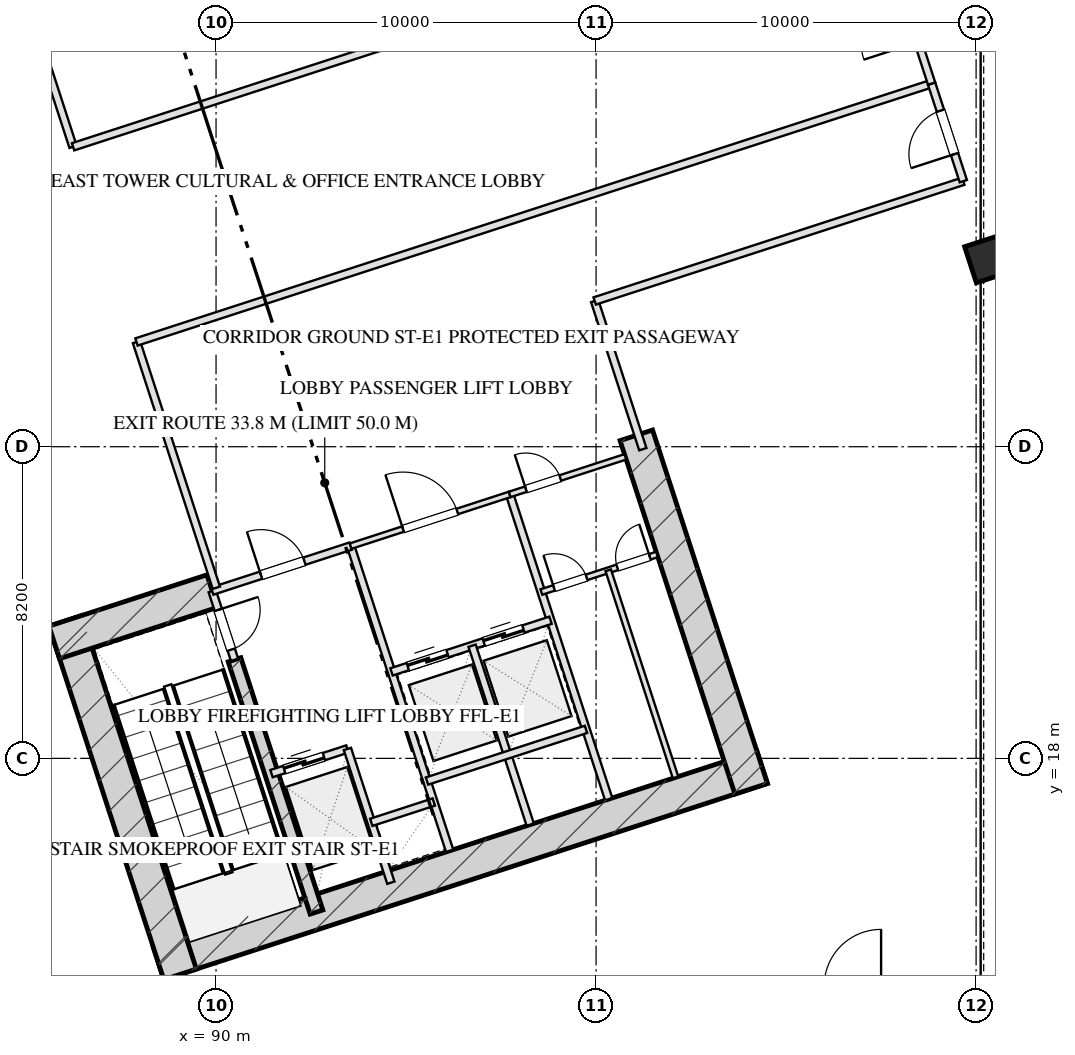
"""IFC4 building model, lengths in metres.
Left out: names, types, materials, properties, quantities, classifications, styles, units other than length and angle.
Written with IfcOpenShell. Run it as: python <this file> out.ifc"""

import sys

from ifc_helpers import new_model, si_unit, direction, frame, frame_2d, origin, origin_2d, place, context, subcontext, project, spatial, rectangle, hollow_rectangle, extrude, element, fill, save


model = new_model("IFC4")
c1 = context("Model", 3, precision=1e-05, world=origin(), true_north=direction((0.0, 1.0)))
c2 = subcontext(c1, "Body", "Model", "MODEL_VIEW")
j1 = project(units=[si_unit("LENGTHUNIT", "METRE"), si_unit("PLANEANGLEUNIT", "RADIAN")], contexts=[c1])
p1 = place(None, origin())
s1 = spatial("IfcSite", under=j1, at=p1, CompositionType="ELEMENT")
p2 = place(p1, origin())
s2 = spatial("IfcBuilding", under=s1, at=p2, CompositionType="ELEMENT")
p3 = place(p2, origin())
s3 = spatial("IfcBuildingStorey", under=s2, at=p3, CompositionType="ELEMENT", Elevation=0.0)
p4 = place(p3, frame((88.487, 12.605, 0.0), z_axis=(0.0, 0.0, 1.0), x_axis=(0.951055016115, 0.309021611416, 0.0)))
e1 = element("IfcWall", 1, at=p4, inside=s3, PredefinedType="SHEAR", context=c2, shape_type="SweptSolid", body=[
    extrude(rectangle(XDim=16.7, YDim=0.9, at=frame_2d((8.35, 0.0))), origin(), (0.0, 0.0, 1.0), 6.0),
])
p5 = place(p3, frame((86.032, 21.618, 0.0), z_axis=(0.0, 0.0, 1.0), x_axis=(0.30901438634, -0.951057363693, 0.0)))
e2 = element("IfcWall", 2, at=p5, inside=s3, PredefinedType="SHEAR", context=c2, shape_type="SweptSolid", body=[
    extrude(rectangle(XDim=9.78, YDim=0.9, at=frame_2d((4.89, 0.0))), origin(), (0.0, 0.0, 1.0), 6.0),
])
p6 = place(p3, frame((101.059, 26.5, 0.0), z_axis=(0.0, 0.0, 1.0), x_axis=(0.309021722829, -0.951054979914, 0.0)))
e3 = element("IfcWall", 3, at=p6, inside=s3, PredefinedType="SHEAR", context=c2, shape_type="SweptSolid", body=[
    extrude(rectangle(XDim=9.78, YDim=0.9, at=frame_2d((4.89, 0.0))), origin(), (0.0, 0.0, 1.0), 6.0),
])
p7 = place(p3, frame((90.486, 20.594, 0.0), z_axis=(0.0, 0.0, 1.0), x_axis=(0.309020428229, -0.951055400562, 0.0)))
e4 = element("IfcWall", 4, at=p7, inside=s3, PredefinedType="SHEAR", context=c2, shape_type="SweptSolid", body=[
    extrude(rectangle(XDim=6.98, YDim=0.35, at=frame_2d((3.49, 0.0))), origin(), (0.0, 0.0, 1.0), 6.0),
])
p8 = place(p3, frame((85.743, 21.051, 0.0), z_axis=(0.0, 0.0, 1.0), x_axis=(0.951063623806, 0.308995118848, 0.0)))
e5 = element("IfcWall", 5, at=p8, inside=s3, PredefinedType="SHEAR", context=c2, shape_type="SweptSolid", body=[
    extrude(rectangle(XDim=4.37, YDim=0.9, at=frame_2d((2.185, 0.0))), origin(), (0.0, 0.0, 1.0), 6.0),
])
p9 = place(p3, frame((110.328, 31.142, 0.0), z_axis=(0.0, 0.0, 1.0), x_axis=(0.951056516295, 0.309016994375, 0.0)))
e6 = element("IfcColumn", 6, at=p9, inside=s3, PredefinedType="COLUMN", context=c2, shape_type="SweptSolid", body=[
    extrude(hollow_rectangle(XDim=1.0, YDim=1.0, WallThickness=0.036, at=origin_2d()), origin(), (0.0, 0.0, 1.0), 6.001),
])
p10 = place(p3, frame((89.899, 22.401, 0.0), z_axis=(0.0, 0.0, 1.0), x_axis=(0.308932062672, -0.951084108086, 0.0)))
e7 = element("IfcWall", 7, at=p10, inside=s3, PredefinedType="PARTITIONING", context=c2, shape_type="SweptSolid", body=[
    extrude(rectangle(XDim=1.9, YDim=0.2, at=frame_2d((0.95, 0.0))), origin(), (0.0, 0.0, 1.0), 5.685),
])
p11 = place(p10, frame((0.52, 0.0, 0.0)))
e8 = element("IfcOpeningElement", 8, at=p11, cuts=e7, PredefinedType="OPENING", context=c2, shape_type="SweptSolid", body=[
    extrude(rectangle(XDim=1.1, YDim=2.05, at=frame_2d((0.55, 1.025))), frame((0.0, 0.11, 0.0), z_axis=(0.0, -1.0, 0.0), x_axis=(1.0, 0.0, 0.0)), (0.0, 0.0, 1.0), 0.22),
])
p12 = place(p3, frame((93.542, 23.585, 0.0), z_axis=(0.0, 0.0, 1.0), x_axis=(0.309042196757, -0.951048327176, 0.0)))
e9 = element("IfcWall", 9, at=p12, inside=s3, PredefinedType="PARTITIONING", context=c2, shape_type="SweptSolid", body=[
    extrude(rectangle(XDim=8.43, YDim=0.2, at=frame_2d((4.215, 0.0))), origin(), (0.0, 0.0, 1.0), 5.685),
])
p13 = place(p3, frame((89.899, 22.401, 0.0), z_axis=(0.0, 0.0, 1.0), x_axis=(0.951046716504, 0.309047153403, 0.0)))
e10 = element("IfcWall", 10, at=p13, inside=s3, PredefinedType="PARTITIONING", context=c2, shape_type="SweptSolid", body=[
    extrude(rectangle(XDim=3.83, YDim=0.2, at=frame_2d((1.915, 0.0))), origin(), (0.0, 0.0, 1.0), 5.685),
])
p14 = place(p13, frame((1.35, 0.0, 0.0)))
e11 = element("IfcOpeningElement", 11, at=p14, cuts=e10, PredefinedType="OPENING", context=c2, shape_type="SweptSolid", body=[
    extrude(rectangle(XDim=1.2, YDim=2.05, at=frame_2d((0.6, 1.025))), frame((0.0, 0.11, 0.0), z_axis=(0.0, -1.0, 0.0), x_axis=(1.0, 0.0, 0.0)), (0.0, 0.0, 1.0), 0.22),
])
p15 = place(p3, frame((91.46, 17.598, 0.0), z_axis=(0.0, 0.0, 1.0), x_axis=(0.951062257173, 0.308999325213, 0.0)))
e12 = element("IfcWall", 12, at=p15, inside=s3, PredefinedType="PARTITIONING", context=c2, shape_type="SweptSolid", body=[
    extrude(rectangle(XDim=2.1, YDim=0.2, at=frame_2d((1.05, 0.0))), origin(), (0.0, 0.0, 1.0), 5.685),
])
p16 = place(p15, frame((0.35, 0.0, 0.0)))
e13 = element("IfcOpeningElement", 13, at=p16, cuts=e12, PredefinedType="OPENING", context=c2, shape_type="SweptSolid", body=[
    extrude(rectangle(XDim=1.1, YDim=2.05, at=frame_2d((0.55, 1.025))), frame((0.0, 0.11, 0.0), z_axis=(0.0, -1.0, 0.0), x_axis=(1.0, 0.0, 0.0)), (0.0, 0.0, 1.0), 0.22),
])
p17 = place(p3, frame((93.457, 18.247, 0.0), z_axis=(0.0, 0.0, 1.0), x_axis=(0.3089935693, -0.951064127245, 0.0)))
e14 = element("IfcWall", 14, at=p17, inside=s3, PredefinedType="PARTITIONING", context=c2, shape_type="SweptSolid", body=[
    extrude(rectangle(XDim=3.7, YDim=0.2, at=frame_2d((1.85, 0.0))), origin(), (0.0, 0.0, 1.0), 5.685),
])
p18 = place(p3, frame((94.084, 16.317, 0.0), z_axis=(0.0, 0.0, 1.0), x_axis=(0.951041328149, 0.309063734775, 0.0)))
e15 = element("IfcWall", 15, at=p18, inside=s3, PredefinedType="PARTITIONING", context=c2, shape_type="SweptSolid", body=[
    extrude(rectangle(XDim=1.73, YDim=0.2, at=frame_2d((0.865, 0.0))), origin(), (0.0, 0.0, 1.0), 5.685),
])
p19 = place(p3, frame((97.727, 24.944, 0.0), z_axis=(0.0, 0.0, 1.0), x_axis=(0.309016001439, -0.951056838919, 0.0)))
e16 = element("IfcWall", 16, at=p19, inside=s3, PredefinedType="PARTITIONING", context=c2, shape_type="SweptSolid", body=[
    extrude(rectangle(XDim=8.43, YDim=0.2, at=frame_2d((4.215, 0.0))), origin(), (0.0, 0.0, 1.0), 5.685),
])
p20 = place(p3, frame((93.542, 23.585, 0.0), z_axis=(0.0, 0.0, 1.0), x_axis=(0.951063829732, 0.308994485023, 0.0)))
e17 = element("IfcWall", 17, at=p20, inside=s3, PredefinedType="PARTITIONING", context=c2, shape_type="SweptSolid", body=[
    extrude(rectangle(XDim=4.4, YDim=0.15, at=frame_2d((2.2, 0.0))), origin(), (0.0, 0.0, 1.0), 5.685),
])
p21 = place(p20, frame((1.45, 0.0, 0.0)))
e18 = element("IfcOpeningElement", 18, at=p21, cuts=e17, PredefinedType="OPENING", context=c2, shape_type="SweptSolid", body=[
    extrude(rectangle(XDim=1.5, YDim=2.05, at=frame_2d((0.75, 1.025))), frame((0.0, 0.085, 0.0), z_axis=(0.0, -1.0, 0.0), x_axis=(1.0, 0.0, 0.0)), (0.0, 0.0, 1.0), 0.17),
])
p22 = place(p3, frame((94.617, 20.275, 0.0), z_axis=(0.0, 0.0, 1.0), x_axis=(0.951058531764, 0.30901079133, 0.0)))
e19 = element("IfcWall", 19, at=p22, inside=s3, PredefinedType="PARTITIONING", context=c2, shape_type="SweptSolid", body=[
    extrude(rectangle(XDim=4.4, YDim=0.2, at=frame_2d((2.2, 0.0))), origin(), (0.0, 0.0, 1.0), 5.685),
])
p23 = place(p22, frame((0.45, 0.0, 0.0)))
e20 = element("IfcOpeningElement", 20, at=p23, cuts=e19, PredefinedType="OPENING", context=c2, shape_type="SweptSolid", body=[
    extrude(rectangle(XDim=1.1, YDim=2.05, at=frame_2d((0.55, 1.025))), frame((0.0, 0.11, 0.0), z_axis=(0.0, -1.0, 0.0), x_axis=(1.0, 0.0, 0.0)), (0.0, 0.0, 1.0), 0.22),
])
p24 = place(p22, frame((2.55, 0.0, 0.0)))
e21 = element("IfcOpeningElement", 21, at=p24, cuts=e19, PredefinedType="OPENING", context=c2, shape_type="SweptSolid", body=[
    extrude(rectangle(XDim=1.1, YDim=2.05, at=frame_2d((0.55, 1.025))), frame((0.0, 0.11, 0.0), z_axis=(0.0, -1.0, 0.0), x_axis=(1.0, 0.0, 0.0)), (0.0, 0.0, 1.0), 0.22),
])
p25 = place(p3, frame((96.738, 20.964, 0.0), z_axis=(0.0, 0.0, 1.0), x_axis=(0.309042578481, -0.951048203135, 0.0)))
e22 = element("IfcWall", 22, at=p25, inside=s3, PredefinedType="PARTITIONING", context=c2, shape_type="SweptSolid", body=[
    extrude(rectangle(XDim=4.95, YDim=0.2, at=frame_2d((2.475, 0.0))), origin(), (0.0, 0.0, 1.0), 5.685),
])
p26 = place(p3, frame((95.551, 17.403, 0.0), z_axis=(0.0, 0.0, 1.0), x_axis=(0.951058531764, 0.30901079133, 0.0)))
e23 = element("IfcWall", 23, at=p26, inside=s3, PredefinedType="PARTITIONING", context=c2, shape_type="SweptSolid", body=[
    extrude(rectangle(XDim=4.4, YDim=0.2, at=frame_2d((2.2, 0.0))), origin(), (0.0, 0.0, 1.0), 5.685),
])
p27 = place(p3, frame((97.727, 24.944, 0.0), z_axis=(0.0, 0.0, 1.0), x_axis=(0.951036872128, 0.309077446369, 0.0)))
e24 = element("IfcWall", 24, at=p27, inside=s3, PredefinedType="PARTITIONING", context=c2, shape_type="SweptSolid", body=[
    extrude(rectangle(XDim=3.2, YDim=0.15, at=frame_2d((1.6, 0.0))), origin(), (0.0, 0.0, 1.0), 5.685),
])
p28 = place(p27, frame((0.45, 0.0, 0.0)))
e25 = element("IfcOpeningElement", 25, at=p28, cuts=e24, PredefinedType="OPENING", context=c2, shape_type="SweptSolid", body=[
    extrude(rectangle(XDim=0.95, YDim=2.05, at=frame_2d((0.475, 1.025))), frame((0.0, 0.085, 0.0), z_axis=(0.0, -1.0, 0.0), x_axis=(1.0, 0.0, 0.0)), (0.0, 0.0, 1.0), 0.17),
])
p29 = place(p3, frame((98.561, 22.376, 0.0), z_axis=(0.0, 0.0, 1.0), x_axis=(0.95104415986, 0.309055020985, 0.0)))
e26 = element("IfcWall", 26, at=p29, inside=s3, PredefinedType="PARTITIONING", context=c2, shape_type="SweptSolid", body=[
    extrude(rectangle(XDim=3.2, YDim=0.15, at=frame_2d((1.6, 0.0))), origin(), (0.0, 0.0, 1.0), 5.685),
])
p30 = place(p29, frame((0.35, 0.0, 0.0)))
e27 = element("IfcOpeningElement", 27, at=p30, cuts=e26, PredefinedType="OPENING", context=c2, shape_type="SweptSolid", body=[
    extrude(rectangle(XDim=0.9, YDim=2.05, at=frame_2d((0.45, 1.025))), frame((0.0, 0.085, 0.0), z_axis=(0.0, -1.0, 0.0), x_axis=(1.0, 0.0, 0.0)), (0.0, 0.0, 1.0), 0.17),
])
p31 = place(p29, frame((2.1, 0.0, 0.0)))
e28 = element("IfcOpeningElement", 28, at=p31, cuts=e26, PredefinedType="OPENING", context=c2, shape_type="SweptSolid", body=[
    extrude(rectangle(XDim=0.9, YDim=2.05, at=frame_2d((0.45, 1.025))), frame((0.0, 0.085, 0.0), z_axis=(0.0, -1.0, 0.0), x_axis=(1.0, 0.0, 0.0)), (0.0, 0.0, 1.0), 0.17),
])
p32 = place(p3, frame((100.32, 22.948, 0.0), z_axis=(0.0, 0.0, 1.0), x_axis=(0.309035009867, -0.951050662518, 0.0)))
e29 = element("IfcWall", 29, at=p32, inside=s3, PredefinedType="PARTITIONING", context=c2, shape_type="SweptSolid", body=[
    extrude(rectangle(XDim=5.73, YDim=0.15, at=frame_2d((2.865, 0.0))), origin(), (0.0, 0.0, 1.0), 5.685),
])
p33 = place(p3, frame((90.008, 22.489, 0.0), z_axis=(0.0, 0.0, 1.0), x_axis=(-0.309023559774, 0.951054383043, 0.0)))
e30 = element("IfcWall", 30, at=p33, inside=s3, PredefinedType="PARTITIONING", context=c2, shape_type="SweptSolid", body=[
    extrude(rectangle(XDim=6.8, YDim=0.2, at=frame_2d((3.4, 0.0))), origin(), (0.0, 0.0, 1.0), 5.685),
])
p34 = place(p3, frame((87.906, 28.956, 0.0), z_axis=(0.0, 0.0, 1.0), x_axis=(0.951056330024, 0.309017567658, 0.0)))
e31 = element("IfcWall", 31, at=p34, inside=s3, PredefinedType="PARTITIONING", context=c2, shape_type="SweptSolid", body=[
    extrude(rectangle(XDim=22.0, YDim=0.2, at=frame_2d((11.0, 0.0))), origin(), (0.0, 0.0, 1.0), 5.685),
])
p35 = place(p3, frame((101.23, 26.135, 0.0), z_axis=(0.0, 0.0, 1.0), x_axis=(-0.30903760131, 0.951049820449, 0.0)))
e32 = element("IfcWall", 32, at=p35, inside=s3, PredefinedType="PARTITIONING", context=c2, shape_type="SweptSolid", body=[
    extrude(rectangle(XDim=4.1, YDim=0.2, at=frame_2d((2.05, 0.0))), origin(), (0.0, 0.0, 1.0), 5.685),
])
p36 = place(p3, frame((99.963, 30.035, 0.0), z_axis=(0.0, 0.0, 1.0), x_axis=(0.951061328589, 0.309002183266, 0.0)))
e33 = element("IfcWall", 33, at=p36, inside=s3, PredefinedType="PARTITIONING", context=c2, shape_type="SweptSolid", body=[
    extrude(rectangle(XDim=10.2, YDim=0.2, at=frame_2d((5.1, 0.0))), origin(), (0.0, 0.0, 1.0), 5.685),
])
p37 = place(p3, frame((109.664, 33.187, 0.0), z_axis=(0.0, 0.0, 1.0), x_axis=(-0.309057448393, 0.951043371037, 0.0)))
e34 = element("IfcWall", 34, at=p37, inside=s3, PredefinedType="PARTITIONING", context=c2, shape_type="SweptSolid", body=[
    extrude(rectangle(XDim=2.7, YDim=0.2, at=frame_2d((1.35, 0.0))), origin(), (0.0, 0.0, 1.0), 5.685),
])
p38 = place(p37, frame((0.75, 0.0, 0.0)))
e35 = element("IfcOpeningElement", 35, at=p38, cuts=e34, PredefinedType="OPENING", context=c2, shape_type="SweptSolid", body=[
    extrude(rectangle(XDim=1.2, YDim=2.05, at=frame_2d((0.6, 1.025))), frame((0.0, 0.11, 0.0), z_axis=(0.0, -1.0, 0.0), x_axis=(1.0, 0.0, 0.0)), (0.0, 0.0, 1.0), 0.22),
])
p39 = place(p3, frame((86.238, 34.092, 0.0), z_axis=(0.0, 0.0, 1.0), x_axis=(-0.309022900594, 0.951054597228, 0.0)))
e36 = element("IfcWall", 36, at=p39, inside=s3, PredefinedType="PARTITIONING", context=c2, shape_type="SweptSolid", body=[
    extrude(rectangle(XDim=9.7, YDim=0.2, at=frame_2d((4.85, 0.0))), origin(), (0.0, 0.0, 1.0), 5.685),
])
p40 = place(p3, frame((86.238, 34.092, 0.0), z_axis=(0.0, 0.0, 1.0), x_axis=(0.951056330024, 0.309017567658, 0.0)))
e37 = element("IfcWall", 37, at=p40, inside=s3, PredefinedType="PARTITIONING", context=c2, shape_type="SweptSolid", body=[
    extrude(rectangle(XDim=22.0, YDim=0.2, at=frame_2d((11.0, 0.0))), origin(), (0.0, 0.0, 1.0), 5.685),
])
p41 = place(p3, frame((108.829, 35.754, 0.0), z_axis=(0.0, 0.0, 1.0), x_axis=(-0.309016555588, 0.951056658866, 0.0)))
e38 = element("IfcWall", 38, at=p41, inside=s3, PredefinedType="PARTITIONING", context=c2, shape_type="SweptSolid", body=[
    extrude(rectangle(XDim=5.4, YDim=0.2, at=frame_2d((2.7, 0.0))), origin(), (0.0, 0.0, 1.0), 5.685),
])
p42 = place(p41, frame((1.15, 0.0, 0.0)))
e39 = element("IfcOpeningElement", 39, at=p42, cuts=e38, PredefinedType="OPENING", context=c2, shape_type="SweptSolid", body=[
    extrude(rectangle(XDim=1.5, YDim=2.05, at=frame_2d((0.75, 1.025))), frame((0.0, 0.11, 0.0), z_axis=(0.0, -1.0, 0.0), x_axis=(1.0, 0.0, 0.0)), (0.0, 0.0, 1.0), 0.22),
])
p43 = place(p11, origin())
e40 = element("IfcDoor", 40, at=p43, inside=s3, OperationType="SINGLE_SWING_LEFT", PredefinedType="DOOR", context=c2, shape_type="SweptSolid", body=[
    extrude(rectangle(XDim=1.1, YDim=2.05, at=frame_2d((0.55, 1.025))), frame((0.0, 0.025, 0.0), z_axis=(0.0, -1.0, 0.0), x_axis=(1.0, 0.0, 0.0)), (0.0, 0.0, 1.0), 0.05),
])
fill(e8, e40)
p44 = place(p14, origin())
e41 = element("IfcDoor", 41, at=p44, inside=s3, OperationType="SINGLE_SWING_LEFT", PredefinedType="DOOR", context=c2, shape_type="SweptSolid", body=[
    extrude(rectangle(XDim=1.2, YDim=2.05, at=frame_2d((0.6, 1.025))), frame((0.0, 0.025, 0.0), z_axis=(0.0, -1.0, 0.0), x_axis=(1.0, 0.0, 0.0)), (0.0, 0.0, 1.0), 0.05),
])
fill(e11, e41)
p45 = place(p16, origin())
e42 = element("IfcDoor", 42, at=p45, inside=s3, OperationType="DOUBLE_DOOR_SLIDING", PredefinedType="DOOR", context=c2, shape_type="SweptSolid", body=[
    extrude(rectangle(XDim=1.1, YDim=2.05, at=frame_2d((0.55, 1.025))), frame((0.0, 0.025, 0.0), z_axis=(0.0, -1.0, 0.0), x_axis=(1.0, 0.0, 0.0)), (0.0, 0.0, 1.0), 0.05),
])
fill(e13, e42)
p46 = place(p21, origin())
e43 = element("IfcDoor", 43, at=p46, inside=s3, OperationType="SINGLE_SWING_LEFT", PredefinedType="DOOR", context=c2, shape_type="SweptSolid", body=[
    extrude(rectangle(XDim=1.5, YDim=2.05, at=frame_2d((0.75, 1.025))), frame((0.0, 0.025, 0.0), z_axis=(0.0, -1.0, 0.0), x_axis=(1.0, 0.0, 0.0)), (0.0, 0.0, 1.0), 0.05),
])
fill(e18, e43)
p47 = place(p23, origin())
e44 = element("IfcDoor", 44, at=p47, inside=s3, OperationType="DOUBLE_DOOR_SLIDING", PredefinedType="DOOR", context=c2, shape_type="SweptSolid", body=[
    extrude(rectangle(XDim=1.1, YDim=2.05, at=frame_2d((0.55, 1.025))), frame((0.0, 0.025, 0.0), z_axis=(0.0, -1.0, 0.0), x_axis=(1.0, 0.0, 0.0)), (0.0, 0.0, 1.0), 0.05),
])
fill(e20, e44)
p48 = place(p24, origin())
e45 = element("IfcDoor", 45, at=p48, inside=s3, OperationType="DOUBLE_DOOR_SLIDING", PredefinedType="DOOR", context=c2, shape_type="SweptSolid", body=[
    extrude(rectangle(XDim=1.1, YDim=2.05, at=frame_2d((0.55, 1.025))), frame((0.0, 0.025, 0.0), z_axis=(0.0, -1.0, 0.0), x_axis=(1.0, 0.0, 0.0)), (0.0, 0.0, 1.0), 0.05),
])
fill(e21, e45)
p49 = place(p28, origin())
e46 = element("IfcDoor", 46, at=p49, inside=s3, OperationType="SINGLE_SWING_LEFT", PredefinedType="DOOR", context=c2, shape_type="SweptSolid", body=[
    extrude(rectangle(XDim=0.95, YDim=2.05, at=frame_2d((0.475, 1.025))), frame((0.0, 0.025, 0.0), z_axis=(0.0, -1.0, 0.0), x_axis=(1.0, 0.0, 0.0)), (0.0, 0.0, 1.0), 0.05),
])
fill(e25, e46)
p50 = place(p30, origin())
e47 = element("IfcDoor", 47, at=p50, inside=s3, OperationType="SINGLE_SWING_LEFT", PredefinedType="DOOR", context=c2, shape_type="SweptSolid", body=[
    extrude(rectangle(XDim=0.9, YDim=2.05, at=frame_2d((0.45, 1.025))), frame((0.0, 0.025, 0.0), z_axis=(0.0, -1.0, 0.0), x_axis=(1.0, 0.0, 0.0)), (0.0, 0.0, 1.0), 0.05),
])
fill(e27, e47)
p51 = place(p31, origin())
e48 = element("IfcDoor", 48, at=p51, inside=s3, OperationType="SINGLE_SWING_RIGHT", PredefinedType="DOOR", context=c2, shape_type="SweptSolid", body=[
    extrude(rectangle(XDim=0.9, YDim=2.05, at=frame_2d((0.45, 1.025))), frame((0.0, 0.025, 0.0), z_axis=(0.0, -1.0, 0.0), x_axis=(1.0, 0.0, 0.0)), (0.0, 0.0, 1.0), 0.05),
])
fill(e28, e48)
p52 = place(p38, origin())
e49 = element("IfcDoor", 49, at=p52, inside=s3, OperationType="SINGLE_SWING_LEFT", PredefinedType="DOOR", context=c2, shape_type="SweptSolid", body=[
    extrude(rectangle(XDim=1.2, YDim=2.05, at=frame_2d((0.6, 1.025))), frame((0.0, 0.025, 0.0), z_axis=(0.0, -1.0, 0.0), x_axis=(1.0, 0.0, 0.0)), (0.0, 0.0, 1.0), 0.05),
])
fill(e35, e49)
save(model, sys.argv[1])
